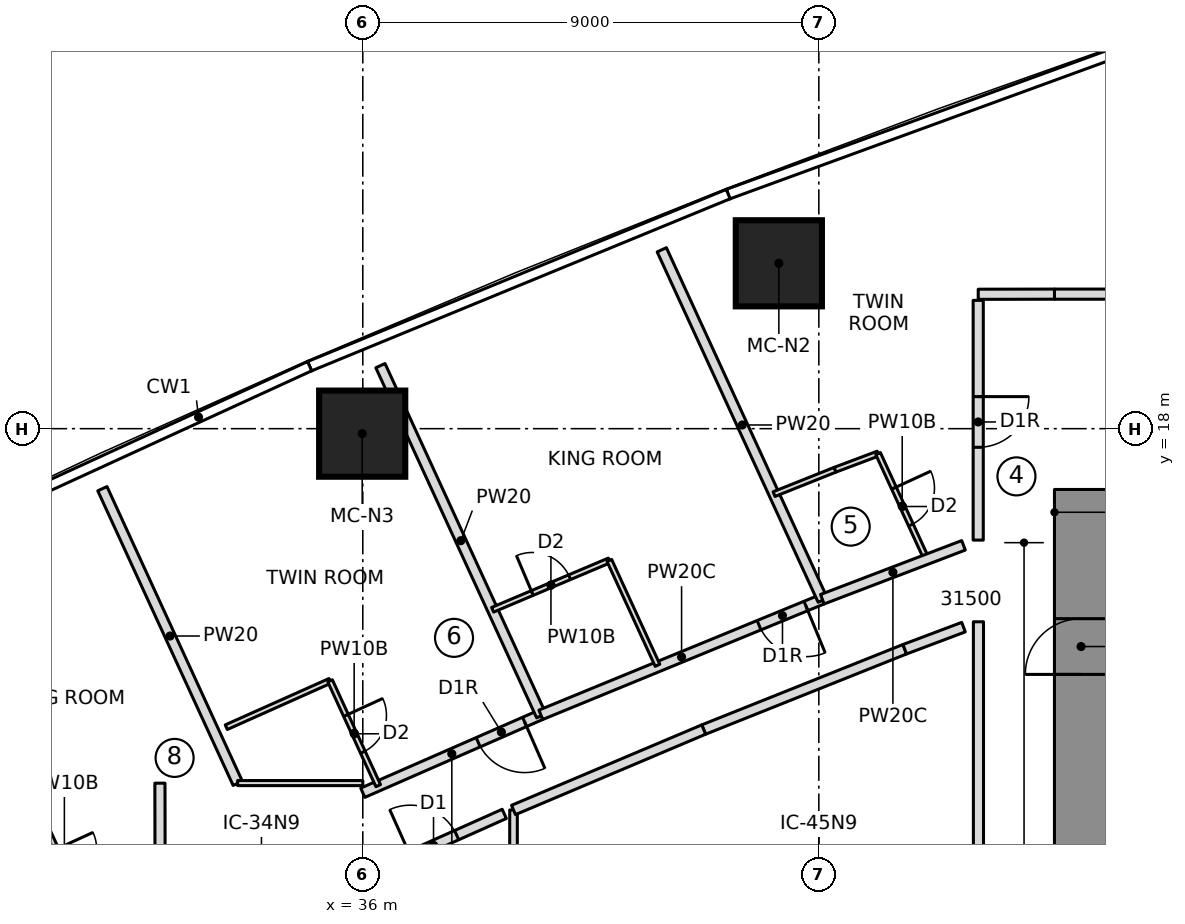
"""IFC4 building model, lengths in metres.
Left out: names, types, materials, properties, quantities, classifications, styles, units other than length and angle.
Written with IfcOpenShell. Run it as: python <this file> out.ifc"""

import sys

from ifc_helpers import new_model, si_unit, direction, frame, frame_2d, origin, origin_2d, place, context, subcontext, project, spatial, rectangle, extrude, element, fill, save


model = new_model("IFC4")
c1 = context("Model", 3, precision=1e-05, world=origin(), true_north=direction((0.0, 1.0)))
c2 = subcontext(c1, "Body", "Model", "MODEL_VIEW")
j1 = project(units=[si_unit("LENGTHUNIT", "METRE"), si_unit("PLANEANGLEUNIT", "RADIAN")], contexts=[c1])
p1 = place(None, origin())
s1 = spatial("IfcSite", under=j1, at=p1, CompositionType="ELEMENT")
p2 = place(p1, origin())
s2 = spatial("IfcBuilding", under=s1, at=p2, CompositionType="ELEMENT")
p3 = place(p2, frame((0.0, 0.0, 106.2)))
s3 = spatial("IfcBuildingStorey", under=s2, at=p3, CompositionType="ELEMENT", Elevation=106.2)
p4 = place(p3, frame((50.175, 6.65, 0.0), z_axis=(0.0, 0.0, 1.0), x_axis=(0.0, 1.0, 0.0)))
e1 = element("IfcWall", 1, at=p4, inside=s3, PredefinedType="SHEAR", context=c2, shape_type="SweptSolid", body=[
    extrude(rectangle(XDim=10.15, YDim=1.05, at=frame_2d((5.075, 0.0))), origin(), (0.0, 0.0, 1.0), 3.55),
])
p5 = place(p4, frame((6.5, 0.0, 0.0)))
e2 = element("IfcOpeningElement", 2, at=p5, cuts=e1, PredefinedType="OPENING", context=c2, shape_type="SweptSolid", body=[
    extrude(rectangle(XDim=1.1, YDim=2.1, at=frame_2d((0.55, 1.05))), frame((0.0, 0.535, 0.0), z_axis=(0.0, -1.0, 0.0), x_axis=(1.0, 0.0, 0.0)), (0.0, 0.0, 1.0), 1.07),
])
for number, where, z_axis, x_axis in (
    (3, (44.211, 21.264, 0.0), (0.0, 0.0, 1.0), (1.0, 0.0, 0.0)),
    (4, (35.988, 17.902, 0.0), (0.0, 0.0, 1.0), (1.0, 0.0, 0.0)),
):
    element("IfcColumn", number, at=place(p3, frame(where, z_axis=z_axis, x_axis=x_axis)), inside=s3, PredefinedType="COLUMN", context=c2, shape_type="SweptSolid", body=[
        extrude(rectangle(XDim=1.7, YDim=1.7, at=origin_2d()), origin(), (0.0, 0.0, 1.0), 3.55),
    ])
p6 = place(p3, frame((29.635, 10.38, 0.0), z_axis=(0.0, 0.0, 1.0), x_axis=(0.417466676952, -0.908692232626, 0.0)))
e5 = element("IfcWall", 5, at=p6, inside=s3, PredefinedType="PARTITIONING", context=c2, shape_type="SweptSolid", body=[
    extrude(rectangle(XDim=2.277, YDim=0.1, at=frame_2d((1.139, 0.0))), origin(), (0.0, 0.0, 1.0), 3.25),
])
p7 = place(p6, frame((0.75, 0.0, 0.0)))
e6 = element("IfcOpeningElement", 6, at=p7, cuts=e5, PredefinedType="OPENING", context=c2, shape_type="SweptSolid", body=[
    extrude(rectangle(XDim=0.8, YDim=2.1, at=frame_2d((0.4, 1.05))), frame((0.0, 0.06, 0.0), z_axis=(0.0, -1.0, 0.0), x_axis=(1.0, 0.0, 0.0)), (0.0, 0.0, 1.0), 0.12),
])
p8 = place(p3, frame((33.532, 11.0, 0.0), z_axis=(0.0, 0.0, 1.0), x_axis=(-0.417441426461, 0.908703832651, 0.0)))
e7 = element("IfcWall", 7, at=p8, inside=s3, PredefinedType="PARTITIONING", context=c2, shape_type="SweptSolid", body=[
    extrude(rectangle(XDim=6.399, YDim=0.2, at=frame_2d((3.2, 0.0))), origin(), (0.0, 0.0, 1.0), 3.25),
])
p9 = place(p3, frame((39.514, 12.353, 0.0), z_axis=(0.0, 0.0, 1.0), x_axis=(-0.916085742373, -0.400982434305, 0.0)))
e8 = element("IfcWall", 8, at=p9, inside=s3, PredefinedType="PARTITIONING", context=c2, shape_type="SweptSolid", body=[
    extrude(rectangle(XDim=3.836, YDim=0.2, at=frame_2d((1.918, 0.0))), origin(), (0.0, 0.0, 1.0), 3.25),
])
p10 = place(p9, frame((0.35, 0.0, 0.0)))
e9 = element("IfcOpeningElement", 9, at=p10, cuts=e8, PredefinedType="OPENING", context=c2, shape_type="SweptSolid", body=[
    extrude(rectangle(XDim=1.0, YDim=2.1, at=frame_2d((0.5, 1.05))), frame((0.0, 0.11, 0.0), z_axis=(0.0, -1.0, 0.0), x_axis=(1.0, 0.0, 0.0)), (0.0, 0.0, 1.0), 0.22),
])
p11 = place(p3, frame((33.306, 12.108, 0.0), z_axis=(0.0, 0.0, 1.0), x_axis=(0.913060453705, 0.407824236504, 0.0)))
e10 = element("IfcWall", 10, at=p11, inside=s3, PredefinedType="PARTITIONING", context=c2, shape_type="SweptSolid", body=[
    extrude(rectangle(XDim=2.243, YDim=0.1, at=frame_2d((1.122, 0.0))), origin(), (0.0, 0.0, 1.0), 3.25),
])
p12 = place(p3, frame((35.354, 13.023, 0.0), z_axis=(0.0, 0.0, 1.0), x_axis=(0.41750734959, -0.908673545911, 0.0)))
e11 = element("IfcWall", 11, at=p12, inside=s3, PredefinedType="PARTITIONING", context=c2, shape_type="SweptSolid", body=[
    extrude(rectangle(XDim=2.277, YDim=0.1, at=frame_2d((1.139, 0.0))), origin(), (0.0, 0.0, 1.0), 3.25),
])
p13 = place(p12, frame((0.75, 0.0, 0.0)))
e12 = element("IfcOpeningElement", 12, at=p13, cuts=e11, PredefinedType="OPENING", context=c2, shape_type="SweptSolid", body=[
    extrude(rectangle(XDim=0.8, YDim=2.1, at=frame_2d((0.4, 1.05))), frame((0.0, 0.06, 0.0), z_axis=(0.0, -1.0, 0.0), x_axis=(1.0, 0.0, 0.0)), (0.0, 0.0, 1.0), 0.12),
])
p14 = place(p3, frame((39.522, 12.334, 0.0), z_axis=(0.0, 0.0, 1.0), x_axis=(-0.417442847913, 0.908703179661, 0.0)))
e13 = element("IfcWall", 13, at=p14, inside=s3, PredefinedType="PARTITIONING", context=c2, shape_type="SweptSolid", body=[
    extrude(rectangle(XDim=7.604, YDim=0.2, at=frame_2d((3.802, 0.0))), origin(), (0.0, 0.0, 1.0), 3.25),
])
p15 = place(p3, frame((45.069, 14.634, 0.0), z_axis=(0.0, 0.0, 1.0), x_axis=(-0.925062421694, -0.379815107611, 0.0)))
e14 = element("IfcWall", 14, at=p15, inside=s3, PredefinedType="PARTITIONING", context=c2, shape_type="SweptSolid", body=[
    extrude(rectangle(XDim=6.005, YDim=0.2, at=frame_2d((3.002, 0.0))), origin(), (0.0, 0.0, 1.0), 3.25),
])
p16 = place(p15, frame((0.35, 0.0, 0.0)))
e15 = element("IfcOpeningElement", 15, at=p16, cuts=e14, PredefinedType="OPENING", context=c2, shape_type="SweptSolid", body=[
    extrude(rectangle(XDim=1.0, YDim=2.1, at=frame_2d((0.5, 1.05))), frame((0.0, 0.11, 0.0), z_axis=(0.0, -1.0, 0.0), x_axis=(1.0, 0.0, 0.0)), (0.0, 0.0, 1.0), 0.22),
])
p17 = place(p3, frame((38.562, 14.426, 0.0), z_axis=(0.0, 0.0, 1.0), x_axis=(0.921042675983, 0.38946166566, 0.0)))
e16 = element("IfcWall", 16, at=p17, inside=s3, PredefinedType="PARTITIONING", context=c2, shape_type="SweptSolid", body=[
    extrude(rectangle(XDim=2.501, YDim=0.1, at=frame_2d((1.25, 0.0))), origin(), (0.0, 0.0, 1.0), 3.25),
])
p18 = place(p17, frame((0.85, 0.0, 0.0)))
e17 = element("IfcOpeningElement", 17, at=p18, cuts=e16, PredefinedType="OPENING", context=c2, shape_type="SweptSolid", body=[
    extrude(rectangle(XDim=0.8, YDim=2.1, at=frame_2d((0.4, 1.05))), frame((0.0, 0.06, 0.0), z_axis=(0.0, -1.0, 0.0), x_axis=(1.0, 0.0, 0.0)), (0.0, 0.0, 1.0), 0.12),
])
p19 = place(p3, frame((40.865, 15.4, 0.0), z_axis=(0.0, 0.0, 1.0), x_axis=(0.417433204355, -0.908707609686, 0.0)))
e18 = element("IfcWall", 18, at=p19, inside=s3, PredefinedType="PARTITIONING", context=c2, shape_type="SweptSolid", body=[
    extrude(rectangle(XDim=2.278, YDim=0.1, at=frame_2d((1.139, 0.0))), origin(), (0.0, 0.0, 1.0), 3.25),
])
p20 = place(p3, frame((45.077, 14.615, 0.0), z_axis=(0.0, 0.0, 1.0), x_axis=(-0.417427858403, 0.908710065438, 0.0)))
e19 = element("IfcWall", 19, at=p20, inside=s3, PredefinedType="PARTITIONING", context=c2, shape_type="SweptSolid", body=[
    extrude(rectangle(XDim=7.61, YDim=0.2, at=frame_2d((3.805, 0.0))), origin(), (0.0, 0.0, 1.0), 3.25),
])
p21 = place(p3, frame((44.116, 16.708, 0.0), z_axis=(0.0, 0.0, 1.0), x_axis=(0.928593389657, 0.371098796393, 0.0)))
e20 = element("IfcWall", 20, at=p21, inside=s3, PredefinedType="PARTITIONING", context=c2, shape_type="SweptSolid", body=[
    extrude(rectangle(XDim=1.298, YDim=0.1, at=frame_2d((0.649, 0.0))), origin(), (0.0, 0.0, 1.0), 3.25),
])
p22 = place(p3, frame((45.321, 17.19, 0.0), z_axis=(0.0, 0.0, 1.0), x_axis=(0.935885332459, 0.352304760808, 0.0)))
e21 = element("IfcWall", 21, at=p22, inside=s3, PredefinedType="PARTITIONING", context=c2, shape_type="SweptSolid", body=[
    extrude(rectangle(XDim=0.906, YDim=0.1, at=frame_2d((0.453, 0.0))), origin(), (0.0, 0.0, 1.0), 3.25),
])
p23 = place(p3, frame((46.169, 17.509, 0.0), z_axis=(0.0, 0.0, 1.0), x_axis=(0.417409478396, -0.90871850831, 0.0)))
e22 = element("IfcWall", 22, at=p23, inside=s3, PredefinedType="PARTITIONING", context=c2, shape_type="SweptSolid", body=[
    extrude(rectangle(XDim=2.283, YDim=0.1, at=frame_2d((1.142, 0.0))), origin(), (0.0, 0.0, 1.0), 3.25),
])
p24 = place(p23, frame((0.75, 0.0, 0.0)))
e23 = element("IfcOpeningElement", 23, at=p24, cuts=e22, PredefinedType="OPENING", context=c2, shape_type="SweptSolid", body=[
    extrude(rectangle(XDim=0.8, YDim=2.1, at=frame_2d((0.4, 1.05))), frame((0.0, 0.06, 0.0), z_axis=(0.0, -1.0, 0.0), x_axis=(1.0, 0.0, 0.0)), (0.0, 0.0, 1.0), 0.12),
])
p25 = place(p3, frame((36.0, 9.15, 0.0), z_axis=(0.0, 0.0, 1.0), x_axis=(0.913029587861, 0.407893333716, 0.0)))
e24 = element("IfcWall", 24, at=p25, inside=s3, PredefinedType="PARTITIONING", context=c2, shape_type="SweptSolid", body=[
    extrude(rectangle(XDim=3.058, YDim=0.2, at=frame_2d((1.529, 0.0))), origin(), (0.0, 0.0, 1.0), 3.25),
])
p26 = place(p25, frame((1.029, 0.0, 0.0)))
e25 = element("IfcOpeningElement", 25, at=p26, cuts=e24, PredefinedType="OPENING", context=c2, shape_type="SweptSolid", body=[
    extrude(rectangle(XDim=1.0, YDim=2.1, at=frame_2d((0.5, 1.05))), frame((0.0, 0.11, 0.0), z_axis=(0.0, -1.0, 0.0), x_axis=(1.0, 0.0, 0.0)), (0.0, 0.0, 1.0), 0.22),
])
p27 = place(p3, frame((38.975, -10.474, 0.0), z_axis=(0.0, 0.0, 1.0), x_axis=(0.0, 1.0, 0.0)))
e26 = element("IfcWall", 26, at=p27, inside=s3, PredefinedType="PARTITIONING", context=c2, shape_type="SweptSolid", body=[
    extrude(rectangle(XDim=20.949, YDim=0.15, at=frame_2d((10.474, 0.0))), origin(), (0.0, 0.0, 1.0), 3.25),
])
p28 = place(p3, frame((42.728, 12.062, 0.0), z_axis=(0.0, 0.0, 1.0), x_axis=(0.928638161177, 0.370986745864, 0.0)))
e27 = element("IfcWall", 27, at=p28, inside=s3, PredefinedType="PARTITIONING", context=c2, shape_type="SweptSolid", body=[
    extrude(rectangle(XDim=4.273, YDim=0.2, at=frame_2d((2.136, 0.0))), origin(), (0.0, 0.0, 1.0), 3.25),
])
p29 = place(p3, frame((38.975, 10.474, 0.0), z_axis=(0.0, 0.0, 1.0), x_axis=(0.921030909625, 0.389489490891, 0.0)))
e28 = element("IfcWall", 28, at=p29, inside=s3, PredefinedType="PARTITIONING", context=c2, shape_type="SweptSolid", body=[
    extrude(rectangle(XDim=4.075, YDim=0.2, at=frame_2d((2.038, 0.0))), origin(), (0.0, 0.0, 1.0), 3.25),
])
p30 = place(p3, frame((54.625, 20.655, 0.0), z_axis=(0.0, 0.0, 1.0), x_axis=(-1.0, 0.0, 0.0)))
e29 = element("IfcWall", 29, at=p30, inside=s3, PredefinedType="PARTITIONING", context=c2, shape_type="SweptSolid", body=[
    extrude(rectangle(XDim=4.976, YDim=0.2, at=frame_2d((2.488, 0.0))), origin(), (0.0, 0.0, 1.0), 3.25),
])
p31 = place(p30, frame((1.988, 0.0, 0.0)))
e30 = element("IfcOpeningElement", 30, at=p31, cuts=e29, PredefinedType="OPENING", context=c2, shape_type="SweptSolid", body=[
    extrude(rectangle(XDim=1.5, YDim=2.1, at=frame_2d((0.75, 1.05))), frame((0.0, 0.11, 0.0), z_axis=(0.0, -1.0, 0.0), x_axis=(1.0, 0.0, 0.0)), (0.0, 0.0, 1.0), 0.22),
])
p32 = place(p3, frame((36.0, 11.005, 0.0), z_axis=(0.0, 0.0, 1.0), x_axis=(-1.0, 0.0, 0.0)))
e31 = element("IfcWall", 31, at=p32, inside=s3, PredefinedType="PARTITIONING", context=c2, shape_type="SweptSolid", body=[
    extrude(rectangle(XDim=2.47, YDim=0.1, at=frame_2d((1.235, 0.0))), origin(), (0.0, 0.0, 1.0), 3.25),
])
p33 = place(p3, frame((47.855, 15.698, 0.0), z_axis=(0.0, 0.0, 1.0), x_axis=(-0.934199537442, -0.35675092746, 0.0)))
e32 = element("IfcWall", 32, at=p33, inside=s3, PredefinedType="PARTITIONING", context=c2, shape_type="SweptSolid", body=[
    extrude(rectangle(XDim=2.982, YDim=0.2, at=frame_2d((1.491, 0.0))), origin(), (0.0, 0.0, 1.0), 3.25),
])
p34 = place(p3, frame((46.696, 13.647, 0.0), z_axis=(0.0, 0.0, 1.0), x_axis=(0.935907269358, 0.352246480696, 0.0)))
e33 = element("IfcWall", 33, at=p34, inside=s3, PredefinedType="PARTITIONING", context=c2, shape_type="SweptSolid", body=[
    extrude(rectangle(XDim=1.239, YDim=0.2, at=frame_2d((0.619, 0.0))), origin(), (0.0, 0.0, 1.0), 3.25),
])
p35 = place(p3, frame((48.15, 14.189, 0.0), z_axis=(0.0, 0.0, 1.0), x_axis=(0.0, -1.0, 0.0)))
e34 = element("IfcWall", 34, at=p35, inside=s3, PredefinedType="PARTITIONING", context=c2, shape_type="SweptSolid", body=[
    extrude(rectangle(XDim=28.377, YDim=0.2, at=frame_2d((14.189, 0.0))), origin(), (0.0, 0.0, 1.0), 3.25),
])
p36 = place(p3, frame((31.997, 11.003, 0.0), z_axis=(0.0, 0.0, 1.0), x_axis=(0.001683296882, -0.999998583255, 0.0)))
e35 = element("IfcWall", 35, at=p36, inside=s3, PredefinedType="PARTITIONING", context=c2, shape_type="SweptSolid", body=[
    extrude(rectangle(XDim=2.031, YDim=0.2, at=frame_2d((1.015, 0.0))), origin(), (0.0, 0.0, 1.0), 3.25),
])
p37 = place(p3, frame((49.65, 20.655, 0.0), z_axis=(0.0, 0.0, 1.0), x_axis=(-0.999998406651, -0.001785131852, 0.0)))
e36 = element("IfcWall", 36, at=p37, inside=s3, PredefinedType="PARTITIONING", context=c2, shape_type="SweptSolid", body=[
    extrude(rectangle(XDim=1.504, YDim=0.2, at=frame_2d((0.752, 0.0))), origin(), (0.0, 0.0, 1.0), 3.25),
])
p38 = place(p3, frame((48.146, 20.532, 0.0), z_axis=(0.0, 0.0, 1.0), x_axis=(-5.1594263e-05, -0.999999998669, 0.0)))
e37 = element("IfcWall", 37, at=p38, inside=s3, PredefinedType="PARTITIONING", context=c2, shape_type="SweptSolid", body=[
    extrude(rectangle(XDim=4.732, YDim=0.2, at=frame_2d((2.366, 0.0))), origin(), (0.0, 0.0, 1.0), 3.25),
])
p39 = place(p38, frame((1.9, 0.0, 0.0)))
e38 = element("IfcOpeningElement", 38, at=p39, cuts=e37, PredefinedType="OPENING", context=c2, shape_type="SweptSolid", body=[
    extrude(rectangle(XDim=1.0, YDim=2.1, at=frame_2d((0.5, 1.05))), frame((0.0, 0.11, 0.0), z_axis=(0.0, -1.0, 0.0), x_axis=(1.0, 0.0, 0.0)), (0.0, 0.0, 1.0), 0.22),
])
p40 = place(p13, origin())
e39 = element("IfcDoor", 39, at=p40, inside=s3, OperationType="SINGLE_SWING_LEFT", PredefinedType="DOOR", context=c2, shape_type="SweptSolid", body=[
    extrude(rectangle(XDim=0.8, YDim=2.1, at=frame_2d((0.4, 1.05))), frame((0.0, 0.025, 0.0), z_axis=(0.0, -1.0, 0.0), x_axis=(1.0, 0.0, 0.0)), (0.0, 0.0, 1.0), 0.05),
])
fill(e12, e39)
p41 = place(p10, origin())
e40 = element("IfcDoor", 40, at=p41, inside=s3, OperationType="SINGLE_SWING_RIGHT", PredefinedType="DOOR", context=c2, shape_type="SweptSolid", body=[
    extrude(rectangle(XDim=1.0, YDim=2.1, at=frame_2d((0.5, 1.05))), frame((0.0, 0.025, 0.0), z_axis=(0.0, -1.0, 0.0), x_axis=(1.0, 0.0, 0.0)), (0.0, 0.0, 1.0), 0.05),
])
fill(e9, e40)
p42 = place(p18, origin())
e41 = element("IfcDoor", 41, at=p42, inside=s3, OperationType="SINGLE_SWING_LEFT", PredefinedType="DOOR", context=c2, shape_type="SweptSolid", body=[
    extrude(rectangle(XDim=0.8, YDim=2.1, at=frame_2d((0.4, 1.05))), frame((0.0, 0.025, 0.0), z_axis=(0.0, -1.0, 0.0), x_axis=(1.0, 0.0, 0.0)), (0.0, 0.0, 1.0), 0.05),
])
fill(e17, e41)
p43 = place(p16, origin())
e42 = element("IfcDoor", 42, at=p43, inside=s3, OperationType="SINGLE_SWING_RIGHT", PredefinedType="DOOR", context=c2, shape_type="SweptSolid", body=[
    extrude(rectangle(XDim=1.0, YDim=2.1, at=frame_2d((0.5, 1.05))), frame((0.0, 0.025, 0.0), z_axis=(0.0, -1.0, 0.0), x_axis=(1.0, 0.0, 0.0)), (0.0, 0.0, 1.0), 0.05),
])
fill(e15, e42)
p44 = place(p24, origin())
e43 = element("IfcDoor", 43, at=p44, inside=s3, OperationType="SINGLE_SWING_LEFT", PredefinedType="DOOR", context=c2, shape_type="SweptSolid", body=[
    extrude(rectangle(XDim=0.8, YDim=2.1, at=frame_2d((0.4, 1.05))), frame((0.0, 0.025, 0.0), z_axis=(0.0, -1.0, 0.0), x_axis=(1.0, 0.0, 0.0)), (0.0, 0.0, 1.0), 0.05),
])
fill(e23, e43)
p45 = place(p26, origin())
e44 = element("IfcDoor", 44, at=p45, inside=s3, OperationType="SINGLE_SWING_LEFT", PredefinedType="DOOR", context=c2, shape_type="SweptSolid", body=[
    extrude(rectangle(XDim=1.0, YDim=2.1, at=frame_2d((0.5, 1.05))), frame((0.0, 0.025, 0.0), z_axis=(0.0, -1.0, 0.0), x_axis=(1.0, 0.0, 0.0)), (0.0, 0.0, 1.0), 0.05),
])
fill(e25, e44)
p46 = place(p39, origin())
e45 = element("IfcDoor", 45, at=p46, inside=s3, OperationType="SINGLE_SWING_RIGHT", PredefinedType="DOOR", context=c2, shape_type="SweptSolid", body=[
    extrude(rectangle(XDim=1.0, YDim=2.1, at=frame_2d((0.5, 1.05))), frame((0.0, 0.025, 0.0), z_axis=(0.0, -1.0, 0.0), x_axis=(1.0, 0.0, 0.0)), (0.0, 0.0, 1.0), 0.05),
])
fill(e38, e45)
p47 = place(p5, origin())
e46 = element("IfcDoor", 46, at=p47, inside=s3, OperationType="SINGLE_SWING_RIGHT", PredefinedType="DOOR", context=c2, shape_type="SweptSolid", body=[
    extrude(rectangle(XDim=1.1, YDim=2.1, at=frame_2d((0.55, 1.05))), frame((0.0, 0.025, 0.0), z_axis=(0.0, -1.0, 0.0), x_axis=(1.0, 0.0, 0.0)), (0.0, 0.0, 1.0), 0.05),
])
fill(e2, e46)
save(model, sys.argv[1])
